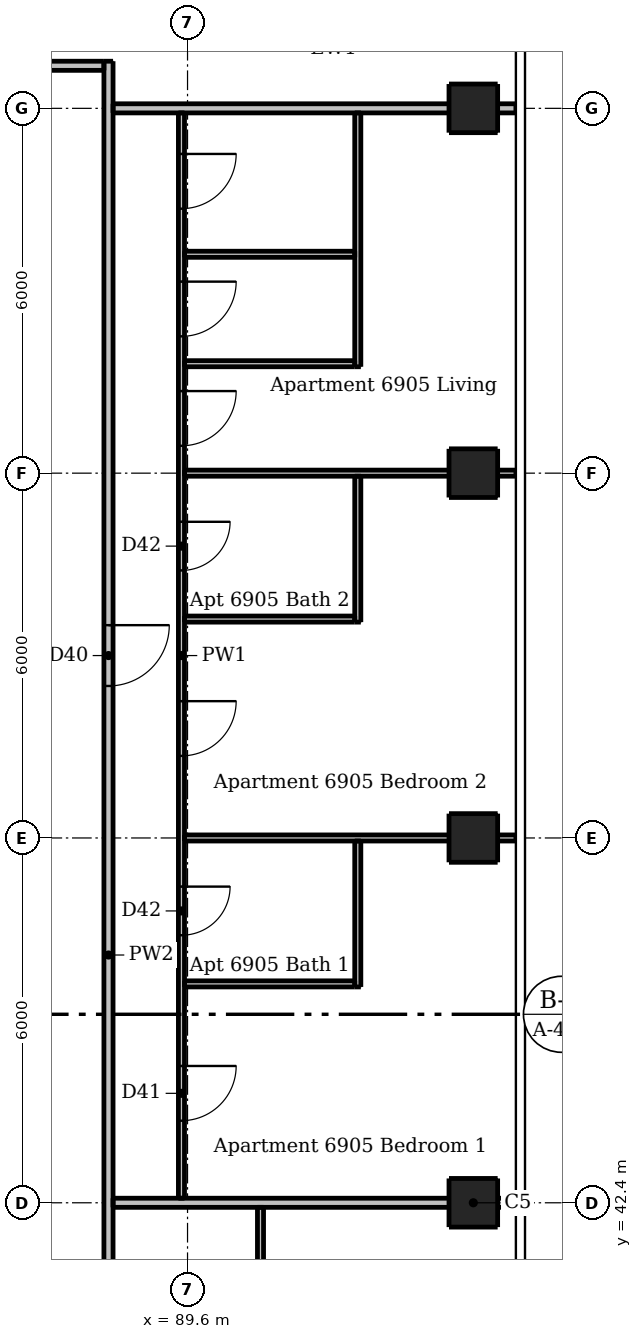
"""IFC4 building model, lengths in metres.
Left out: names, types, materials, properties, quantities, classifications, styles, units other than length and angle.
Written with IfcOpenShell. Run it as: python <this file> out.ifc"""

import sys

from ifc_helpers import new_model, si_unit, direction, frame, frame_2d, origin, origin_2d, place, context, subcontext, project, spatial, rectangle, extrude, element, fill, save


model = new_model("IFC4")
c1 = context("Model", 3, precision=1e-05, world=origin(), true_north=direction((0.0, 1.0)))
c2 = subcontext(c1, "Body", "Model", "MODEL_VIEW")
j1 = project(units=[si_unit("LENGTHUNIT", "METRE"), si_unit("PLANEANGLEUNIT", "RADIAN")], contexts=[c1])
p1 = place(None, origin())
s1 = spatial("IfcSite", under=j1, at=p1, CompositionType="ELEMENT")
p2 = place(p1, origin())
s2 = spatial("IfcBuilding", under=s1, at=p2, CompositionType="ELEMENT")
p3 = place(p2, frame((0.0, 0.0, 258.7)))
s3 = spatial("IfcBuildingStorey", under=s2, at=p3, CompositionType="ELEMENT", Elevation=258.7)
for number, where, z_axis, x_axis in (
    (1, (94.3, 42.4, 0.0), (0.0, 0.0, 1.0), (1.0, 0.0, 0.0)),
    (2, (94.3, 48.4, 0.0), (0.0, 0.0, 1.0), (1.0, 0.0, 0.0)),
    (3, (94.3, 54.4, 0.0), (0.0, 0.0, 1.0), (1.0, 0.0, 0.0)),
    (4, (94.3, 60.4, 0.0), (0.0, 0.0, 1.0), (1.0, 0.0, 0.0)),
):
    element("IfcColumn", number, at=place(p3, frame(where, z_axis=z_axis, x_axis=x_axis)), inside=s3, PredefinedType="COLUMN", context=c2, shape_type="SweptSolid", body=[
        extrude(rectangle(XDim=0.8, YDim=0.8, at=origin_2d()), origin(), (0.0, 0.0, 1.0), 3.05),
    ])
p4 = place(p3, frame((89.5, 60.325, 0.0), z_axis=(0.0, 0.0, 1.0), x_axis=(0.0, -1.0, 0.0)))
e5 = element("IfcWall", 5, at=p4, inside=s3, PredefinedType="PARTITIONING", context=c2, shape_type="SweptSolid", body=[
    extrude(rectangle(XDim=17.85, YDim=0.1, at=frame_2d((8.925, 0.0))), origin(), (0.0, 0.0, 1.0), 3.05),
])
p5 = place(p4, frame((4.575, 0.0, 0.0)))
e6 = element("IfcOpeningElement", 6, at=p5, cuts=e5, PredefinedType="OPENING", context=c2, shape_type="SweptSolid", body=[
    extrude(rectangle(XDim=0.9, YDim=2.1, at=frame_2d((0.45, 1.05))), frame((0.0, 0.06, 0.0), z_axis=(0.0, -1.0, 0.0), x_axis=(1.0, 0.0, 0.0)), (0.0, 0.0, 1.0), 0.12),
])
p6 = place(p4, frame((0.675, 0.0, 0.0)))
e7 = element("IfcOpeningElement", 7, at=p6, cuts=e5, PredefinedType="OPENING", context=c2, shape_type="SweptSolid", body=[
    extrude(rectangle(XDim=0.9, YDim=2.1, at=frame_2d((0.45, 1.05))), frame((0.0, 0.06, 0.0), z_axis=(0.0, -1.0, 0.0), x_axis=(1.0, 0.0, 0.0)), (0.0, 0.0, 1.0), 0.12),
])
p7 = place(p4, frame((2.775, 0.0, 0.0)))
e8 = element("IfcOpeningElement", 8, at=p7, cuts=e5, PredefinedType="OPENING", context=c2, shape_type="SweptSolid", body=[
    extrude(rectangle(XDim=0.9, YDim=2.1, at=frame_2d((0.45, 1.05))), frame((0.0, 0.06, 0.0), z_axis=(0.0, -1.0, 0.0), x_axis=(1.0, 0.0, 0.0)), (0.0, 0.0, 1.0), 0.12),
])
p8 = place(p4, frame((15.675, 0.0, 0.0)))
e9 = element("IfcOpeningElement", 9, at=p8, cuts=e5, PredefinedType="OPENING", context=c2, shape_type="SweptSolid", body=[
    extrude(rectangle(XDim=0.9, YDim=2.1, at=frame_2d((0.45, 1.05))), frame((0.0, 0.06, 0.0), z_axis=(0.0, -1.0, 0.0), x_axis=(1.0, 0.0, 0.0)), (0.0, 0.0, 1.0), 0.12),
])
p9 = place(p4, frame((9.675, 0.0, 0.0)))
e10 = element("IfcOpeningElement", 10, at=p9, cuts=e5, PredefinedType="OPENING", context=c2, shape_type="SweptSolid", body=[
    extrude(rectangle(XDim=0.9, YDim=2.1, at=frame_2d((0.45, 1.05))), frame((0.0, 0.06, 0.0), z_axis=(0.0, -1.0, 0.0), x_axis=(1.0, 0.0, 0.0)), (0.0, 0.0, 1.0), 0.12),
])
p10 = place(p4, frame((12.725, 0.0, 0.0)))
e11 = element("IfcOpeningElement", 11, at=p10, cuts=e5, PredefinedType="OPENING", context=c2, shape_type="SweptSolid", body=[
    extrude(rectangle(XDim=0.8, YDim=2.1, at=frame_2d((0.4, 1.05))), frame((0.0, 0.06, 0.0), z_axis=(0.0, -1.0, 0.0), x_axis=(1.0, 0.0, 0.0)), (0.0, 0.0, 1.0), 0.12),
])
p11 = place(p4, frame((6.725, 0.0, 0.0)))
e12 = element("IfcOpeningElement", 12, at=p11, cuts=e5, PredefinedType="OPENING", context=c2, shape_type="SweptSolid", body=[
    extrude(rectangle(XDim=0.8, YDim=2.1, at=frame_2d((0.4, 1.05))), frame((0.0, 0.06, 0.0), z_axis=(0.0, -1.0, 0.0), x_axis=(1.0, 0.0, 0.0)), (0.0, 0.0, 1.0), 0.12),
])
p12 = place(p3, frame((90.8, 36.45, 0.0), z_axis=(0.0, 0.0, 1.0), x_axis=(0.0, 1.0, 0.0)))
e13 = element("IfcWall", 13, at=p12, inside=s3, PredefinedType="PARTITIONING", context=c2, shape_type="SweptSolid", body=[
    extrude(rectangle(XDim=5.875, YDim=0.1, at=frame_2d((2.938, 0.0))), origin(), (0.0, 0.0, 1.0), 3.05),
])
p13 = place(p12, frame((3.75, 0.0, 0.0)))
e14 = element("IfcOpeningElement", 14, at=p13, cuts=e13, PredefinedType="OPENING", context=c2, shape_type="SweptSolid", body=[
    extrude(rectangle(XDim=0.8, YDim=2.1, at=frame_2d((0.4, 1.05))), frame((0.0, 0.06, 0.0), z_axis=(0.0, -1.0, 0.0), x_axis=(1.0, 0.0, 0.0)), (0.0, 0.0, 1.0), 0.12),
])
for number, where, z_axis, x_axis in (
    (15, (92.4, 45.95, 0.0), (0.0, 0.0, 1.0), (0.0, 1.0, 0.0)),
    (16, (92.4, 51.95, 0.0), (0.0, 0.0, 1.0), (0.0, 1.0, 0.0)),
):
    element("IfcWall", number, at=place(p3, frame(where, z_axis=z_axis, x_axis=x_axis)), inside=s3, PredefinedType="PARTITIONING", context=c2, shape_type="SweptSolid", body=[
        extrude(rectangle(XDim=2.4, YDim=0.1, at=frame_2d((1.2, 0.0))), origin(), (0.0, 0.0, 1.0), 3.05),
    ])
p14 = place(p3, frame((92.4, 56.15, 0.0), z_axis=(0.0, 0.0, 1.0), x_axis=(0.0, 1.0, 0.0)))
e17 = element("IfcWall", 17, at=p14, inside=s3, PredefinedType="PARTITIONING", context=c2, shape_type="SweptSolid", body=[
    extrude(rectangle(XDim=4.175, YDim=0.1, at=frame_2d((2.087, 0.0))), origin(), (0.0, 0.0, 1.0), 3.05),
])
for number, where, z_axis, x_axis in (
    (18, (89.55, 58.0, 0.0), (0.0, 0.0, 1.0), (1.0, 0.0, 0.0)),
    (19, (89.55, 56.2, 0.0), (0.0, 0.0, 1.0), (1.0, 0.0, 0.0)),
):
    element("IfcWall", number, at=place(p3, frame(where, z_axis=z_axis, x_axis=x_axis)), inside=s3, PredefinedType="PARTITIONING", context=c2, shape_type="SweptSolid", body=[
        extrude(rectangle(XDim=2.8, YDim=0.1, at=frame_2d((1.4, 0.0))), origin(), (0.0, 0.0, 1.0), 3.05),
    ])
p15 = place(p3, frame((89.55, 54.4, 0.0), z_axis=(0.0, 0.0, 1.0), x_axis=(1.0, 0.0, 0.0)))
e20 = element("IfcWall", 20, at=p15, inside=s3, PredefinedType="PARTITIONING", context=c2, shape_type="SweptSolid", body=[
    extrude(rectangle(XDim=5.45, YDim=0.1, at=frame_2d((2.725, 0.0))), origin(), (0.0, 0.0, 1.0), 2.589),
])
p16 = place(p3, frame((89.55, 52.0, 0.0), z_axis=(0.0, 0.0, 1.0), x_axis=(1.0, 0.0, 0.0)))
e21 = element("IfcWall", 21, at=p16, inside=s3, PredefinedType="PARTITIONING", context=c2, shape_type="SweptSolid", body=[
    extrude(rectangle(XDim=2.8, YDim=0.1, at=frame_2d((1.4, 0.0))), origin(), (0.0, 0.0, 1.0), 3.05),
])
p17 = place(p3, frame((89.55, 48.4, 0.0), z_axis=(0.0, 0.0, 1.0), x_axis=(1.0, 0.0, 0.0)))
e22 = element("IfcWall", 22, at=p17, inside=s3, PredefinedType="PARTITIONING", context=c2, shape_type="SweptSolid", body=[
    extrude(rectangle(XDim=5.45, YDim=0.1, at=frame_2d((2.725, 0.0))), origin(), (0.0, 0.0, 1.0), 2.589),
])
p18 = place(p3, frame((89.55, 46.0, 0.0), z_axis=(0.0, 0.0, 1.0), x_axis=(1.0, 0.0, 0.0)))
e23 = element("IfcWall", 23, at=p18, inside=s3, PredefinedType="PARTITIONING", context=c2, shape_type="SweptSolid", body=[
    extrude(rectangle(XDim=2.8, YDim=0.1, at=frame_2d((1.4, 0.0))), origin(), (0.0, 0.0, 1.0), 3.05),
])
p19 = place(p3, frame((88.3, 61.175, 0.0), z_axis=(0.0, 0.0, 1.0), x_axis=(0.0, -1.0, 0.0)))
e24 = element("IfcWall", 24, at=p19, inside=s3, PredefinedType="PARTITIONING", context=c2, shape_type="SweptSolid", body=[
    extrude(rectangle(XDim=29.4, YDim=0.15, at=frame_2d((14.7, 0.0))), origin(), (0.0, 0.0, 1.0), 3.05),
])
p20 = place(p19, frame((26.625, 0.0, 0.0)))
e25 = element("IfcOpeningElement", 25, at=p20, cuts=e24, PredefinedType="OPENING", context=c2, shape_type="SweptSolid", body=[
    extrude(rectangle(XDim=1.0, YDim=2.1, at=frame_2d((0.5, 1.05))), frame((0.0, 0.085, 0.0), z_axis=(0.0, -1.0, 0.0), x_axis=(1.0, 0.0, 0.0)), (0.0, 0.0, 1.0), 0.17),
])
p21 = place(p19, frame((9.275, 0.0, 0.0)))
e26 = element("IfcOpeningElement", 26, at=p21, cuts=e24, PredefinedType="OPENING", context=c2, shape_type="SweptSolid", body=[
    extrude(rectangle(XDim=1.0, YDim=2.1, at=frame_2d((0.5, 1.05))), frame((0.0, 0.085, 0.0), z_axis=(0.0, -1.0, 0.0), x_axis=(1.0, 0.0, 0.0)), (0.0, 0.0, 1.0), 0.17),
])
p22 = place(p3, frame((58.975, 61.1, 0.0), z_axis=(0.0, 0.0, 1.0), x_axis=(1.0, 0.0, 0.0)))
e27 = element("IfcWall", 27, at=p22, inside=s3, PredefinedType="PARTITIONING", context=c2, shape_type="SweptSolid", body=[
    extrude(rectangle(XDim=29.25, YDim=0.15, at=frame_2d((14.625, 0.0))), origin(), (0.0, 0.0, 1.0), 3.05),
])
p23 = place(p22, frame((4.325, 0.0, 0.0)))
e28 = element("IfcOpeningElement", 28, at=p23, cuts=e27, PredefinedType="OPENING", context=c2, shape_type="SweptSolid", body=[
    extrude(rectangle(XDim=1.0, YDim=2.1, at=frame_2d((0.5, 1.05))), frame((0.0, 0.085, 0.0), z_axis=(0.0, -1.0, 0.0), x_axis=(1.0, 0.0, 0.0)), (0.0, 0.0, 1.0), 0.17),
])
p24 = place(p22, frame((15.125, 0.0, 0.0)))
e29 = element("IfcOpeningElement", 29, at=p24, cuts=e27, PredefinedType="OPENING", context=c2, shape_type="SweptSolid", body=[
    extrude(rectangle(XDim=1.0, YDim=2.1, at=frame_2d((0.5, 1.05))), frame((0.0, 0.085, 0.0), z_axis=(0.0, -1.0, 0.0), x_axis=(1.0, 0.0, 0.0)), (0.0, 0.0, 1.0), 0.17),
])
p25 = place(p22, frame((26.475, 0.0, 0.0)))
e30 = element("IfcOpeningElement", 30, at=p25, cuts=e27, PredefinedType="OPENING", context=c2, shape_type="SweptSolid", body=[
    extrude(rectangle(XDim=1.0, YDim=2.1, at=frame_2d((0.5, 1.05))), frame((0.0, 0.085, 0.0), z_axis=(0.0, -1.0, 0.0), x_axis=(1.0, 0.0, 0.0)), (0.0, 0.0, 1.0), 0.17),
])
p26 = place(p3, frame((88.375, 60.4, 0.0), z_axis=(0.0, 0.0, 1.0), x_axis=(1.0, 0.0, 0.0)))
e31 = element("IfcWall", 31, at=p26, inside=s3, PredefinedType="PARTITIONING", context=c2, shape_type="SweptSolid", body=[
    extrude(rectangle(XDim=6.625, YDim=0.15, at=frame_2d((3.312, 0.0))), origin(), (0.0, 0.0, 1.0), 2.647),
])
p27 = place(p3, frame((88.375, 42.4, 0.0), z_axis=(0.0, 0.0, 1.0), x_axis=(1.0, 0.0, 0.0)))
e32 = element("IfcWall", 32, at=p27, inside=s3, PredefinedType="PARTITIONING", context=c2, shape_type="SweptSolid", body=[
    extrude(rectangle(XDim=6.625, YDim=0.15, at=frame_2d((3.312, 0.0))), origin(), (0.0, 0.0, 1.0), 2.589),
])
p28 = place(p21, origin())
e33 = element("IfcDoor", 33, at=p28, inside=s3, OperationType="SINGLE_SWING_LEFT", PredefinedType="DOOR", context=c2, shape_type="SweptSolid", body=[
    extrude(rectangle(XDim=1.0, YDim=2.1, at=frame_2d((0.5, 1.05))), frame((0.0, 0.025, 0.0), z_axis=(0.0, -1.0, 0.0), x_axis=(1.0, 0.0, 0.0)), (0.0, 0.0, 1.0), 0.05),
])
fill(e26, e33)
p29 = place(p5, origin())
e34 = element("IfcDoor", 34, at=p29, inside=s3, OperationType="SINGLE_SWING_LEFT", PredefinedType="DOOR", context=c2, shape_type="SweptSolid", body=[
    extrude(rectangle(XDim=0.9, YDim=2.1, at=frame_2d((0.45, 1.05))), frame((0.0, 0.025, 0.0), z_axis=(0.0, -1.0, 0.0), x_axis=(1.0, 0.0, 0.0)), (0.0, 0.0, 1.0), 0.05),
])
fill(e6, e34)
p30 = place(p6, origin())
e35 = element("IfcDoor", 35, at=p30, inside=s3, OperationType="SINGLE_SWING_LEFT", PredefinedType="DOOR", context=c2, shape_type="SweptSolid", body=[
    extrude(rectangle(XDim=0.9, YDim=2.1, at=frame_2d((0.45, 1.05))), frame((0.0, 0.025, 0.0), z_axis=(0.0, -1.0, 0.0), x_axis=(1.0, 0.0, 0.0)), (0.0, 0.0, 1.0), 0.05),
])
fill(e7, e35)
p31 = place(p7, origin())
e36 = element("IfcDoor", 36, at=p31, inside=s3, OperationType="SINGLE_SWING_LEFT", PredefinedType="DOOR", context=c2, shape_type="SweptSolid", body=[
    extrude(rectangle(XDim=0.9, YDim=2.1, at=frame_2d((0.45, 1.05))), frame((0.0, 0.025, 0.0), z_axis=(0.0, -1.0, 0.0), x_axis=(1.0, 0.0, 0.0)), (0.0, 0.0, 1.0), 0.05),
])
fill(e8, e36)
p32 = place(p8, origin())
e37 = element("IfcDoor", 37, at=p32, inside=s3, OperationType="SINGLE_SWING_LEFT", PredefinedType="DOOR", context=c2, shape_type="SweptSolid", body=[
    extrude(rectangle(XDim=0.9, YDim=2.1, at=frame_2d((0.45, 1.05))), frame((0.0, 0.025, 0.0), z_axis=(0.0, -1.0, 0.0), x_axis=(1.0, 0.0, 0.0)), (0.0, 0.0, 1.0), 0.05),
])
fill(e9, e37)
p33 = place(p9, origin())
e38 = element("IfcDoor", 38, at=p33, inside=s3, OperationType="SINGLE_SWING_LEFT", PredefinedType="DOOR", context=c2, shape_type="SweptSolid", body=[
    extrude(rectangle(XDim=0.9, YDim=2.1, at=frame_2d((0.45, 1.05))), frame((0.0, 0.025, 0.0), z_axis=(0.0, -1.0, 0.0), x_axis=(1.0, 0.0, 0.0)), (0.0, 0.0, 1.0), 0.05),
])
fill(e10, e38)
p34 = place(p10, origin())
e39 = element("IfcDoor", 39, at=p34, inside=s3, OperationType="SINGLE_SWING_LEFT", PredefinedType="DOOR", context=c2, shape_type="SweptSolid", body=[
    extrude(rectangle(XDim=0.8, YDim=2.1, at=frame_2d((0.4, 1.05))), frame((0.0, 0.025, 0.0), z_axis=(0.0, -1.0, 0.0), x_axis=(1.0, 0.0, 0.0)), (0.0, 0.0, 1.0), 0.05),
])
fill(e11, e39)
p35 = place(p11, origin())
e40 = element("IfcDoor", 40, at=p35, inside=s3, OperationType="SINGLE_SWING_LEFT", PredefinedType="DOOR", context=c2, shape_type="SweptSolid", body=[
    extrude(rectangle(XDim=0.8, YDim=2.1, at=frame_2d((0.4, 1.05))), frame((0.0, 0.025, 0.0), z_axis=(0.0, -1.0, 0.0), x_axis=(1.0, 0.0, 0.0)), (0.0, 0.0, 1.0), 0.05),
])
fill(e12, e40)
save(model, sys.argv[1])
